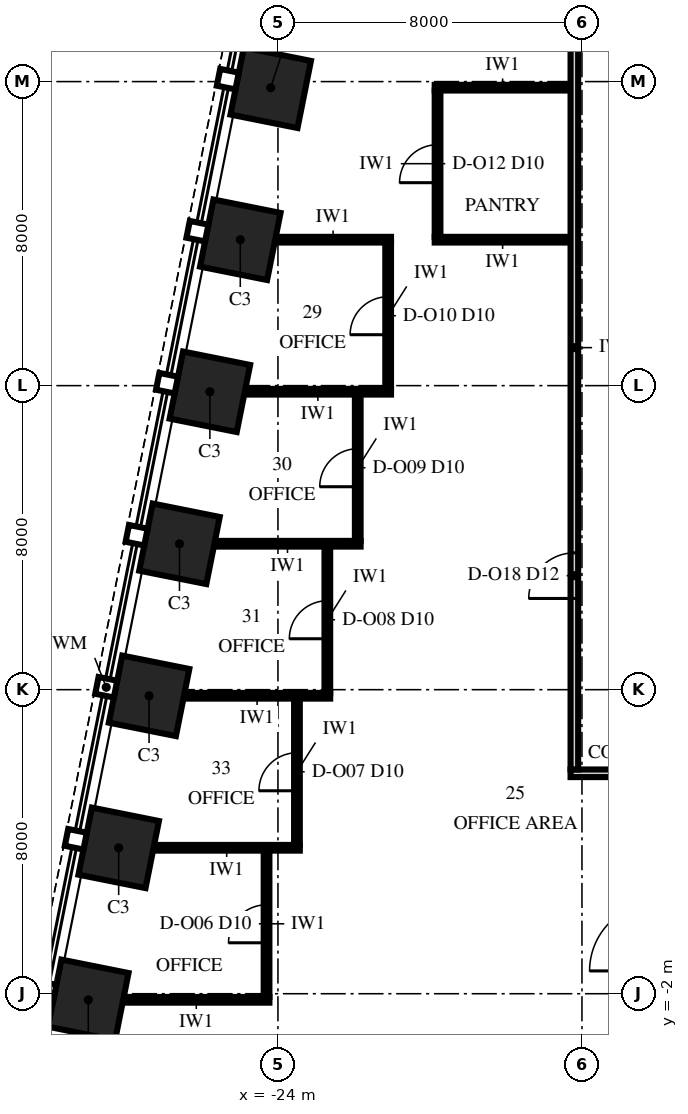
"""IFC4 building model, lengths in metres.
Left out: names, types, materials, properties, quantities, classifications, styles, units other than length and angle.
Written with IfcOpenShell. Run it as: python <this file> out.ifc"""

import sys

from ifc_helpers import new_model, si_unit, direction, frame, frame_2d, origin, origin_2d, place, context, subcontext, project, spatial, rectangle, extrude, element, fill, save


model = new_model("IFC4")
c1 = context("Model", 3, precision=1e-05, world=origin(), true_north=direction((0.0, 1.0)))
c2 = subcontext(c1, "Body", "Model", "MODEL_VIEW")
j1 = project(units=[si_unit("LENGTHUNIT", "METRE"), si_unit("PLANEANGLEUNIT", "RADIAN")], contexts=[c1])
p1 = place(None, origin())
s1 = spatial("IfcSite", under=j1, at=p1, CompositionType="ELEMENT")
p2 = place(p1, origin())
s2 = spatial("IfcBuilding", under=s1, at=p2, CompositionType="ELEMENT")
p3 = place(p2, frame((0.0, 0.0, 103.0)))
s3 = spatial("IfcBuildingStorey", under=s2, at=p3, CompositionType="ELEMENT", Elevation=103.0)
for number, where, z_axis, x_axis in (
    (1, (-24.191, 21.838, 0.0), (0.0, 0.0, 1.0), (-0.196, -0.981, 0.0)),
    (2, (-24.991, 17.838, 0.0), (0.0, 0.0, 1.0), (-0.196, -0.981, 0.0)),
    (3, (-25.791, 13.838, 0.0), (0.0, 0.0, 1.0), (-0.196, -0.981, 0.0)),
    (4, (-26.591, 9.838, 0.0), (0.0, 0.0, 1.0), (-0.196, -0.981, 0.0)),
    (5, (-27.391, 5.838, 0.0), (0.0, 0.0, 1.0), (-0.196, -0.981, 0.0)),
    (6, (-28.191, 1.838, 0.0), (0.0, 0.0, 1.0), (-0.196, -0.981, 0.0)),
    (7, (-28.991, -2.162, 0.0), (0.0, 0.0, 1.0), (-0.196, -0.981, 0.0)),
):
    element("IfcColumn", number, at=place(p3, frame(where, z_axis=z_axis, x_axis=x_axis)), inside=s3, PredefinedType="COLUMN", context=c2, shape_type="SweptSolid", body=[
        extrude(rectangle(XDim=1.8, YDim=1.8, at=origin_2d()), origin(), (0.0, 0.0, 1.0), 4.0),
    ])
for number, where, z_axis, x_axis in (
    (8, (-28.073, -2.16, 0.0), (0.0, 0.0, 1.0), (1.0, 0.0, 0.0)),
    (9, (-27.273, 1.84, 0.0), (0.0, 0.0, 1.0), (1.0, 0.0, 0.0)),
):
    element("IfcWall", number, at=place(p3, frame(where, z_axis=z_axis, x_axis=x_axis)), inside=s3, PredefinedType="PARTITIONING", context=c2, shape_type="SweptSolid", body=[
        extrude(rectangle(XDim=3.848, YDim=0.15, at=frame_2d((1.924, 0.0))), origin(), (0.0, 0.0, 1.0), 3.25),
    ])
p4 = place(p3, frame((-16.3, 3.8, 0.0), z_axis=(0.0, 0.0, 1.0), x_axis=(1.0, 0.0, 0.0)))
e10 = element("IfcWall", 10, at=p4, inside=s3, PredefinedType="PARTITIONING", context=c2, shape_type="SweptSolid", body=[
    extrude(rectangle(XDim=32.6, YDim=0.2, at=frame_2d((16.3, 0.0))), origin(), (0.0, 0.0, 1.0), 3.25),
])
p5 = place(p4, frame((5.7, 0.0, 0.0)))
e11 = element("IfcOpeningElement", 11, at=p5, cuts=e10, PredefinedType="OPENING", context=c2, shape_type="SweptSolid", body=[
    extrude(rectangle(XDim=1.2, YDim=2.4, at=frame_2d((0.6, 1.2))), frame((0.0, 0.115, 0.0), z_axis=(0.0, -1.0, 0.0), x_axis=(1.0, 0.0, 0.0)), (0.0, 0.0, 1.0), 0.23),
])
p6 = place(p4, frame((17.7, 0.0, 0.0)))
e12 = element("IfcOpeningElement", 12, at=p6, cuts=e10, PredefinedType="OPENING", context=c2, shape_type="SweptSolid", body=[
    extrude(rectangle(XDim=1.2, YDim=2.4, at=frame_2d((0.6, 1.2))), frame((0.0, 0.115, 0.0), z_axis=(0.0, -1.0, 0.0), x_axis=(1.0, 0.0, 0.0)), (0.0, 0.0, 1.0), 0.23),
])
p7 = place(p3, frame((-26.473, 5.84, 0.0), z_axis=(0.0, 0.0, 1.0), x_axis=(1.0, 0.0, 0.0)))
e13 = element("IfcWall", 13, at=p7, inside=s3, PredefinedType="PARTITIONING", context=c2, shape_type="SweptSolid", body=[
    extrude(rectangle(XDim=3.848, YDim=0.15, at=frame_2d((1.924, 0.0))), origin(), (0.0, 0.0, 1.0), 2.842),
])
for number, where, z_axis, x_axis in (
    (14, (-25.673, 9.84, 0.0), (0.0, 0.0, 1.0), (1.0, 0.0, 0.0)),
    (15, (-24.873, 13.84, 0.0), (0.0, 0.0, 1.0), (1.0, 0.0, 0.0)),
):
    element("IfcWall", number, at=place(p3, frame(where, z_axis=z_axis, x_axis=x_axis)), inside=s3, PredefinedType="PARTITIONING", context=c2, shape_type="SweptSolid", body=[
        extrude(rectangle(XDim=3.848, YDim=0.15, at=frame_2d((1.924, 0.0))), origin(), (0.0, 0.0, 1.0), 3.25),
    ])
p8 = place(p3, frame((-24.073, 17.84, 0.0), z_axis=(0.0, 0.0, 1.0), x_axis=(1.0, 0.0, 0.0)))
e16 = element("IfcWall", 16, at=p8, inside=s3, PredefinedType="PARTITIONING", context=c2, shape_type="SweptSolid", body=[
    extrude(rectangle(XDim=3.048, YDim=0.15, at=frame_2d((1.524, 0.0))), origin(), (0.0, 0.0, 1.0), 3.25),
])
p9 = place(p3, frame((-19.875, 17.84, 0.0), z_axis=(0.0, 0.0, 1.0), x_axis=(1.0, 0.0, 0.0)))
e17 = element("IfcWall", 17, at=p9, inside=s3, PredefinedType="PARTITIONING", context=c2, shape_type="SweptSolid", body=[
    extrude(rectangle(XDim=3.575, YDim=0.15, at=frame_2d((1.788, 0.0))), origin(), (0.0, 0.0, 1.0), 3.25),
])
p10 = place(p3, frame((-19.875, 21.84, 0.0), z_axis=(0.0, 0.0, 1.0), x_axis=(1.0, 0.0, 0.0)))
e18 = element("IfcWall", 18, at=p10, inside=s3, PredefinedType="PARTITIONING", context=c2, shape_type="SweptSolid", body=[
    extrude(rectangle(XDim=3.575, YDim=0.15, at=frame_2d((1.788, 0.0))), origin(), (0.0, 0.0, 1.0), 3.4),
])
p11 = place(p3, frame((-24.3, -2.085, 0.0), z_axis=(0.0, 0.0, 1.0), x_axis=(0.0, 1.0, 0.0)))
e19 = element("IfcWall", 19, at=p11, inside=s3, PredefinedType="PARTITIONING", context=c2, shape_type="SweptSolid", body=[
    extrude(rectangle(XDim=3.85, YDim=0.15, at=frame_2d((1.925, 0.0))), origin(), (0.0, 0.0, 1.0), 3.85),
])
p12 = place(p11, frame((1.425, 0.0, 0.0)))
e20 = element("IfcOpeningElement", 20, at=p12, cuts=e19, PredefinedType="OPENING", context=c2, shape_type="SweptSolid", body=[
    extrude(rectangle(XDim=1.0, YDim=2.3, at=frame_2d((0.5, 1.15))), frame((0.0, 0.09, 0.0), z_axis=(0.0, -1.0, 0.0), x_axis=(1.0, 0.0, 0.0)), (0.0, 0.0, 1.0), 0.18),
])
p13 = place(p3, frame((-23.5, 1.915, 0.0), z_axis=(0.0, 0.0, 1.0), x_axis=(0.0, 1.0, 0.0)))
e21 = element("IfcWall", 21, at=p13, inside=s3, PredefinedType="PARTITIONING", context=c2, shape_type="SweptSolid", body=[
    extrude(rectangle(XDim=3.85, YDim=0.15, at=frame_2d((1.925, 0.0))), origin(), (0.0, 0.0, 1.0), 3.85),
])
p14 = place(p13, frame((1.425, 0.0, 0.0)))
e22 = element("IfcOpeningElement", 22, at=p14, cuts=e21, PredefinedType="OPENING", context=c2, shape_type="SweptSolid", body=[
    extrude(rectangle(XDim=1.0, YDim=2.3, at=frame_2d((0.5, 1.15))), frame((0.0, 0.09, 0.0), z_axis=(0.0, -1.0, 0.0), x_axis=(1.0, 0.0, 0.0)), (0.0, 0.0, 1.0), 0.18),
])
p15 = place(p3, frame((-22.7, 5.915, 0.0), z_axis=(0.0, 0.0, 1.0), x_axis=(0.0, 1.0, 0.0)))
e23 = element("IfcWall", 23, at=p15, inside=s3, PredefinedType="PARTITIONING", context=c2, shape_type="SweptSolid", body=[
    extrude(rectangle(XDim=3.85, YDim=0.15, at=frame_2d((1.925, 0.0))), origin(), (0.0, 0.0, 1.0), 2.842),
])
p16 = place(p15, frame((1.425, 0.0, 0.0)))
e24 = element("IfcOpeningElement", 24, at=p16, cuts=e23, PredefinedType="OPENING", context=c2, shape_type="SweptSolid", body=[
    extrude(rectangle(XDim=1.0, YDim=2.3, at=frame_2d((0.5, 1.15))), frame((0.0, 0.09, 0.0), z_axis=(0.0, -1.0, 0.0), x_axis=(1.0, 0.0, 0.0)), (0.0, 0.0, 1.0), 0.18),
])
p17 = place(p3, frame((-21.9, 9.915, 0.0), z_axis=(0.0, 0.0, 1.0), x_axis=(0.0, 1.0, 0.0)))
e25 = element("IfcWall", 25, at=p17, inside=s3, PredefinedType="PARTITIONING", context=c2, shape_type="SweptSolid", body=[
    extrude(rectangle(XDim=3.85, YDim=0.15, at=frame_2d((1.925, 0.0))), origin(), (0.0, 0.0, 1.0), 3.85),
])
p18 = place(p17, frame((1.425, 0.0, 0.0)))
e26 = element("IfcOpeningElement", 26, at=p18, cuts=e25, PredefinedType="OPENING", context=c2, shape_type="SweptSolid", body=[
    extrude(rectangle(XDim=1.0, YDim=2.3, at=frame_2d((0.5, 1.15))), frame((0.0, 0.09, 0.0), z_axis=(0.0, -1.0, 0.0), x_axis=(1.0, 0.0, 0.0)), (0.0, 0.0, 1.0), 0.18),
])
p19 = place(p3, frame((-21.1, 13.915, 0.0), z_axis=(0.0, 0.0, 1.0), x_axis=(0.0, 1.0, 0.0)))
e27 = element("IfcWall", 27, at=p19, inside=s3, PredefinedType="PARTITIONING", context=c2, shape_type="SweptSolid", body=[
    extrude(rectangle(XDim=3.85, YDim=0.15, at=frame_2d((1.925, 0.0))), origin(), (0.0, 0.0, 1.0), 3.25),
])
p20 = place(p19, frame((1.425, 0.0, 0.0)))
e28 = element("IfcOpeningElement", 28, at=p20, cuts=e27, PredefinedType="OPENING", context=c2, shape_type="SweptSolid", body=[
    extrude(rectangle(XDim=1.0, YDim=2.3, at=frame_2d((0.5, 1.15))), frame((0.0, 0.09, 0.0), z_axis=(0.0, -1.0, 0.0), x_axis=(1.0, 0.0, 0.0)), (0.0, 0.0, 1.0), 0.18),
])
p21 = place(p3, frame((-19.8, 17.915, 0.0), z_axis=(0.0, 0.0, 1.0), x_axis=(0.0, 1.0, 0.0)))
e29 = element("IfcWall", 29, at=p21, inside=s3, PredefinedType="PARTITIONING", context=c2, shape_type="SweptSolid", body=[
    extrude(rectangle(XDim=3.85, YDim=0.15, at=frame_2d((1.925, 0.0))), origin(), (0.0, 0.0, 1.0), 3.25),
])
p22 = place(p21, frame((1.425, 0.0, 0.0)))
e30 = element("IfcOpeningElement", 30, at=p22, cuts=e29, PredefinedType="OPENING", context=c2, shape_type="SweptSolid", body=[
    extrude(rectangle(XDim=1.0, YDim=2.3, at=frame_2d((0.5, 1.15))), frame((0.0, 0.09, 0.0), z_axis=(0.0, -1.0, 0.0), x_axis=(1.0, 0.0, 0.0)), (0.0, 0.0, 1.0), 0.18),
])
p23 = place(p3, frame((-16.2, 3.9, 0.0), z_axis=(0.0, 0.0, 1.0), x_axis=(0.0, 1.0, 0.0)))
e31 = element("IfcWall", 31, at=p23, inside=s3, PredefinedType="PARTITIONING", context=c2, shape_type="SweptSolid", body=[
    extrude(rectangle(XDim=22.2, YDim=0.2, at=frame_2d((11.1, 0.0))), origin(), (0.0, 0.0, 1.0), 2.842),
])
p24 = place(p23, frame((4.5, 0.0, 0.0)))
e32 = element("IfcOpeningElement", 32, at=p24, cuts=e31, PredefinedType="OPENING", context=c2, shape_type="SweptSolid", body=[
    extrude(rectangle(XDim=1.2, YDim=2.4, at=frame_2d((0.6, 1.2))), frame((0.0, 0.115, 0.0), z_axis=(0.0, -1.0, 0.0), x_axis=(1.0, 0.0, 0.0)), (0.0, 0.0, 1.0), 0.23),
])
p25 = place(p12, origin())
e33 = element("IfcDoor", 33, at=p25, inside=s3, OperationType="SINGLE_SWING_LEFT", PredefinedType="DOOR", context=c2, shape_type="SweptSolid", body=[
    extrude(rectangle(XDim=1.0, YDim=2.3, at=frame_2d((0.5, 1.15))), frame((0.0, 0.075, 0.0), z_axis=(0.0, -1.0, 0.0), x_axis=(1.0, 0.0, 0.0)), (0.0, 0.0, 1.0), 0.149),
])
fill(e20, e33)
p26 = place(p14, origin())
e34 = element("IfcDoor", 34, at=p26, inside=s3, OperationType="SINGLE_SWING_LEFT", PredefinedType="DOOR", context=c2, shape_type="SweptSolid", body=[
    extrude(rectangle(XDim=1.0, YDim=2.3, at=frame_2d((0.5, 1.15))), frame((0.0, 0.075, 0.0), z_axis=(0.0, -1.0, 0.0), x_axis=(1.0, 0.0, 0.0)), (0.0, 0.0, 1.0), 0.149),
])
fill(e22, e34)
p27 = place(p16, origin())
e35 = element("IfcDoor", 35, at=p27, inside=s3, OperationType="SINGLE_SWING_LEFT", PredefinedType="DOOR", context=c2, shape_type="SweptSolid", body=[
    extrude(rectangle(XDim=1.0, YDim=2.3, at=frame_2d((0.5, 1.15))), frame((0.0, 0.075, 0.0), z_axis=(0.0, -1.0, 0.0), x_axis=(1.0, 0.0, 0.0)), (0.0, 0.0, 1.0), 0.149),
])
fill(e24, e35)
p28 = place(p18, origin())
e36 = element("IfcDoor", 36, at=p28, inside=s3, OperationType="SINGLE_SWING_LEFT", PredefinedType="DOOR", context=c2, shape_type="SweptSolid", body=[
    extrude(rectangle(XDim=1.0, YDim=2.3, at=frame_2d((0.5, 1.15))), frame((0.0, 0.075, 0.0), z_axis=(0.0, -1.0, 0.0), x_axis=(1.0, 0.0, 0.0)), (0.0, 0.0, 1.0), 0.149),
])
fill(e26, e36)
p29 = place(p20, origin())
e37 = element("IfcDoor", 37, at=p29, inside=s3, OperationType="SINGLE_SWING_LEFT", PredefinedType="DOOR", context=c2, shape_type="SweptSolid", body=[
    extrude(rectangle(XDim=1.0, YDim=2.3, at=frame_2d((0.5, 1.15))), frame((0.0, 0.075, 0.0), z_axis=(0.0, -1.0, 0.0), x_axis=(1.0, 0.0, 0.0)), (0.0, 0.0, 1.0), 0.149),
])
fill(e28, e37)
p30 = place(p22, origin())
e38 = element("IfcDoor", 38, at=p30, inside=s3, OperationType="SINGLE_SWING_LEFT", PredefinedType="DOOR", context=c2, shape_type="SweptSolid", body=[
    extrude(rectangle(XDim=1.0, YDim=2.3, at=frame_2d((0.5, 1.15))), frame((0.0, 0.075, 0.0), z_axis=(0.0, -1.0, 0.0), x_axis=(1.0, 0.0, 0.0)), (0.0, 0.0, 1.0), 0.149),
])
fill(e30, e38)
p31 = place(p24, origin())
e39 = element("IfcDoor", 39, at=p31, inside=s3, OperationType="SINGLE_SWING_LEFT", PredefinedType="DOOR", context=c2, shape_type="SweptSolid", body=[
    extrude(rectangle(XDim=1.2, YDim=2.4, at=frame_2d((0.6, 1.2))), frame((0.0, 0.1, 0.0), z_axis=(0.0, -1.0, 0.0), x_axis=(1.0, 0.0, 0.0)), (0.0, 0.0, 1.0), 0.199),
])
fill(e32, e39)
save(model, sys.argv[1])
